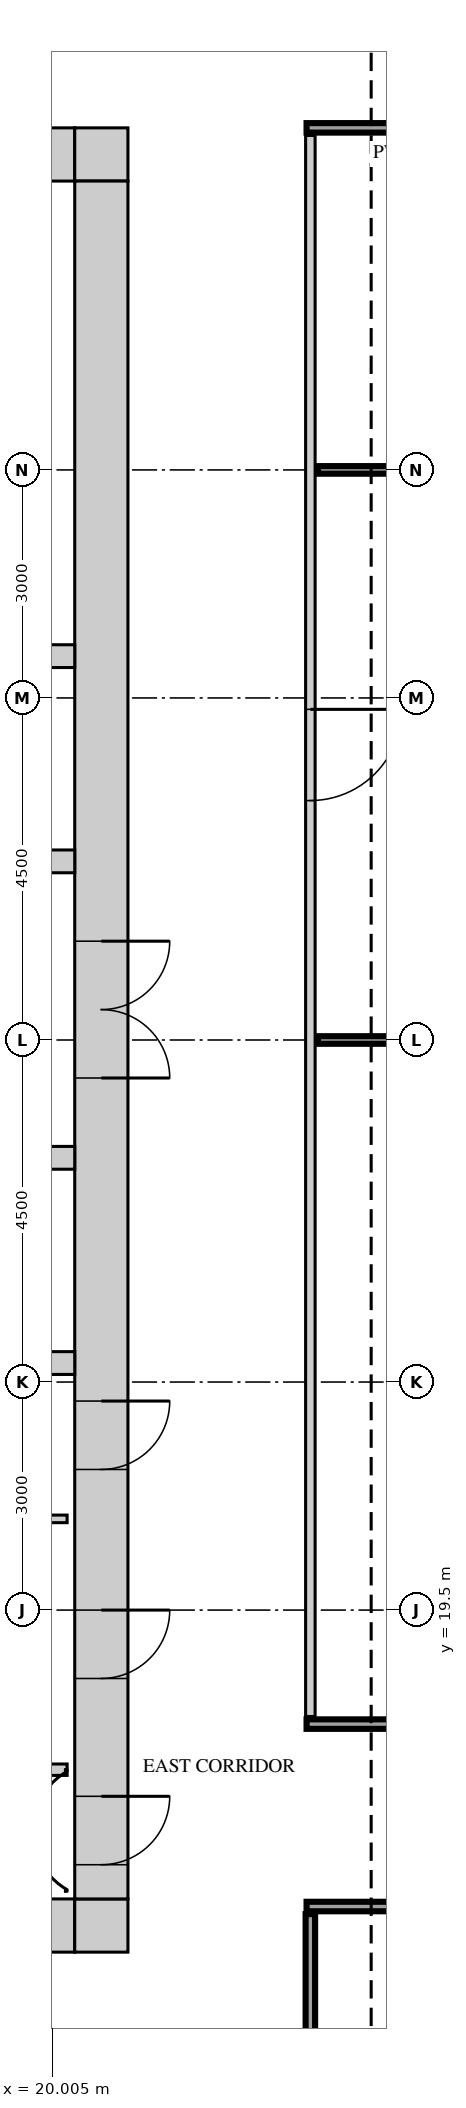
"""IFC4 building model, lengths in metres.
Left out: names, types, materials, properties, quantities, classifications, styles, units other than length and angle.
Written with IfcOpenShell. Run it as: python <this file> out.ifc"""

import sys

from ifc_helpers import new_model, si_unit, direction, frame, frame_2d, origin, place, context, subcontext, project, spatial, rectangle, extrude, source, transform, mapped, element, fill, save


model = new_model("IFC4")
c1 = context("Model", 3, precision=1e-05, world=origin(), true_north=direction((0.0, 1.0)))
c2 = subcontext(c1, "Body", "Model", "MODEL_VIEW")
j1 = project(units=[si_unit("LENGTHUNIT", "METRE"), si_unit("PLANEANGLEUNIT", "RADIAN")], contexts=[c1])
p1 = place(None, origin())
s1 = spatial("IfcSite", under=j1, at=p1, CompositionType="ELEMENT")
p2 = place(p1, origin())
s2 = spatial("IfcBuilding", under=s1, at=p2, CompositionType="ELEMENT")
p3 = place(p2, frame((0.0, 0.0, 250.2)))
s3 = spatial("IfcBuildingStorey", under=s2, at=p3, CompositionType="ELEMENT", Elevation=250.2)
m1 = source(origin(), c2, "Body", "SweptSolid", [
    extrude(rectangle(XDim=13.6, YDim=0.7, at=frame_2d((6.8, 0.0))), origin(), (0.0, 0.0, 1.0), 3.75),
])
p4 = place(p3, frame((6.7, 38.65, 0.0), z_axis=(0.0, 0.0, 1.0), x_axis=(1.0, 0.0, 0.0)))
e1 = element("IfcWall", 1, at=p4, inside=s3, PredefinedType="SHEAR", context=c2, shape_type="MappedRepresentation", body=[
    mapped(m1, transform((0.0, 0.0, 0.0))),
])
m2 = source(origin(), c2, "Body", "SweptSolid", [
    extrude(rectangle(XDim=0.9, YDim=2.1, at=frame_2d((0.45, 1.05))), frame((0.0, 0.36, 0.0), z_axis=(0.0, -1.0, 0.0), x_axis=(1.0, 0.0, 0.0)), (0.0, 0.0, 1.0), 0.72),
])
p5 = place(p4, frame((3.0, 0.0, 0.0)))
e2 = element("IfcOpeningElement", 2, at=p5, cuts=e1, PredefinedType="OPENING", context=c2, shape_type="MappedRepresentation", body=[
    mapped(m2, transform((0.0, 0.0, 0.0))),
])
p6 = place(p4, frame((9.7, 0.0, 0.0)))
e3 = element("IfcOpeningElement", 3, at=p6, cuts=e1, PredefinedType="OPENING", context=c2, shape_type="MappedRepresentation", body=[
    mapped(m2, transform((0.0, 0.0, 0.0))),
])
m3 = source(origin(), c2, "Body", "SweptSolid", [
    extrude(rectangle(XDim=0.7, YDim=0.7, at=frame_2d((0.35, 0.0))), origin(), (0.0, 0.0, 1.0), 3.75),
])
p7 = place(p3, frame((20.3, 38.65, 0.0), z_axis=(0.0, 0.0, 1.0), x_axis=(1.0, 0.0, 0.0)))
e4 = element("IfcWall", 4, at=p7, inside=s3, PredefinedType="SHEAR", context=c2, shape_type="MappedRepresentation", body=[
    mapped(m3, transform((0.0, 0.0, 0.0))),
])
p8 = place(p3, frame((6.7, 15.35, 0.0), z_axis=(0.0, 0.0, 1.0), x_axis=(1.0, 0.0, 0.0)))
e5 = element("IfcWall", 5, at=p8, inside=s3, PredefinedType="SHEAR", context=c2, shape_type="MappedRepresentation", body=[
    mapped(m1, transform((0.0, 0.0, 0.0))),
])
m4 = source(origin(), c2, "Body", "SweptSolid", [
    extrude(rectangle(XDim=1.2, YDim=2.1, at=frame_2d((0.6, 1.05))), frame((0.0, 0.36, 0.0), z_axis=(0.0, -1.0, 0.0), x_axis=(1.0, 0.0, 0.0)), (0.0, 0.0, 1.0), 0.72),
])
p9 = place(p8, frame((5.5, 0.0, 0.0)))
e6 = element("IfcOpeningElement", 6, at=p9, cuts=e5, PredefinedType="OPENING", context=c2, shape_type="MappedRepresentation", body=[
    mapped(m4, transform((0.0, 0.0, 0.0))),
])
p10 = place(p8, frame((2.15, 0.0, 0.0)))
e7 = element("IfcOpeningElement", 7, at=p10, cuts=e5, PredefinedType="OPENING", context=c2, shape_type="MappedRepresentation", body=[
    mapped(m4, transform((0.0, 0.0, 0.0))),
])
m5 = source(origin(), c2, "Body", "SweptSolid", [
    extrude(rectangle(XDim=1.0, YDim=2.1, at=frame_2d((0.5, 1.05))), frame((0.0, 0.36, 0.0), z_axis=(0.0, -1.0, 0.0), x_axis=(1.0, 0.0, 0.0)), (0.0, 0.0, 1.0), 0.72),
])
p11 = place(p8, frame((8.0, 0.0, 0.0)))
e8 = element("IfcOpeningElement", 8, at=p11, cuts=e5, PredefinedType="OPENING", context=c2, shape_type="MappedRepresentation", body=[
    mapped(m5, transform((0.0, 0.0, 0.0))),
])
p12 = place(p3, frame((20.3, 15.35, 0.0), z_axis=(0.0, 0.0, 1.0), x_axis=(1.0, 0.0, 0.0)))
e9 = element("IfcWall", 9, at=p12, inside=s3, PredefinedType="SHEAR", context=c2, shape_type="MappedRepresentation", body=[
    mapped(m3, transform((0.0, 0.0, 0.0))),
])
m6 = source(origin(), c2, "Body", "SweptSolid", [
    extrude(rectangle(XDim=22.6, YDim=0.7, at=frame_2d((11.3, 0.0))), origin(), (0.0, 0.0, 1.0), 3.75),
])
p13 = place(p3, frame((20.65, 15.7, 0.0), z_axis=(0.0, 0.0, 1.0), x_axis=(0.0, 1.0, 0.0)))
e10 = element("IfcWall", 10, at=p13, inside=s3, PredefinedType="SHEAR", context=c2, shape_type="MappedRepresentation", body=[
    mapped(m6, transform((0.0, 0.0, 0.0))),
])
m7 = source(origin(), c2, "Body", "SweptSolid", [
    extrude(rectangle(XDim=1.8, YDim=2.1, at=frame_2d((0.9, 1.05))), frame((0.0, 0.36, 0.0), z_axis=(0.0, -1.0, 0.0), x_axis=(1.0, 0.0, 0.0)), (0.0, 0.0, 1.0), 0.72),
])
p14 = place(p13, frame((10.8, 0.0, 0.0)))
e11 = element("IfcOpeningElement", 11, at=p14, cuts=e10, PredefinedType="OPENING", context=c2, shape_type="MappedRepresentation", body=[
    mapped(m7, transform((0.0, 0.0, 0.0))),
])
p15 = place(p13, frame((0.45, 0.0, 0.0)))
e12 = element("IfcOpeningElement", 12, at=p15, cuts=e10, PredefinedType="OPENING", context=c2, shape_type="MappedRepresentation", body=[
    mapped(m2, transform((0.0, 0.0, 0.0))),
])
p16 = place(p13, frame((2.9, 0.0, 0.0)))
e13 = element("IfcOpeningElement", 13, at=p16, cuts=e10, PredefinedType="OPENING", context=c2, shape_type="MappedRepresentation", body=[
    mapped(m2, transform((0.0, 0.0, 0.0))),
])
p17 = place(p13, frame((5.65, 0.0, 0.0)))
e14 = element("IfcOpeningElement", 14, at=p17, cuts=e10, PredefinedType="OPENING", context=c2, shape_type="MappedRepresentation", body=[
    mapped(m2, transform((0.0, 0.0, 0.0))),
])
m8 = source(origin(), c2, "Body", "SweptSolid", [
    extrude(rectangle(XDim=13.6, YDim=0.3, at=frame_2d((6.8, 0.0))), origin(), (0.0, 0.0, 1.0), 3.75),
])
for number, where, z_axis, x_axis in (
    (15, (6.7, 22.75, 0.0), (0.0, 0.0, 1.0), (1.0, 0.0, 0.0)),
    (16, (6.7, 32.05, 0.0), (0.0, 0.0, 1.0), (1.0, 0.0, 0.0)),
):
    element("IfcWall", number, at=place(p3, frame(where, z_axis=z_axis, x_axis=x_axis)), inside=s3, PredefinedType="STANDARD", context=c2, shape_type="MappedRepresentation", body=[
        mapped(m8, transform((0.0, 0.0, 0.0))),
    ])
p18 = place(p3, frame((6.7, 29.35, 0.0), z_axis=(0.0, 0.0, 1.0), x_axis=(1.0, 0.0, 0.0)))
e17 = element("IfcWall", 17, at=p18, inside=s3, PredefinedType="STANDARD", context=c2, shape_type="MappedRepresentation", body=[
    mapped(m8, transform((0.0, 0.0, 0.0))),
])
m9 = source(origin(), c2, "Body", "SweptSolid", [
    extrude(rectangle(XDim=1.2, YDim=2.1, at=frame_2d((0.6, 1.05))), frame((0.0, 0.16, 0.0), z_axis=(0.0, -1.0, 0.0), x_axis=(1.0, 0.0, 0.0)), (0.0, 0.0, 1.0), 0.32),
])
p19 = place(p18, frame((1.05, 0.0, 0.0)))
e18 = element("IfcOpeningElement", 18, at=p19, cuts=e17, PredefinedType="OPENING", context=c2, shape_type="MappedRepresentation", body=[
    mapped(m9, transform((0.0, 0.0, 0.0))),
])
p20 = place(p18, frame((3.6, 0.0, 0.0)))
e19 = element("IfcOpeningElement", 19, at=p20, cuts=e17, PredefinedType="OPENING", context=c2, shape_type="MappedRepresentation", body=[
    mapped(m9, transform((0.0, 0.0, 0.0))),
])
p21 = place(p18, frame((6.15, 0.0, 0.0)))
e20 = element("IfcOpeningElement", 20, at=p21, cuts=e17, PredefinedType="OPENING", context=c2, shape_type="MappedRepresentation", body=[
    mapped(m9, transform((0.0, 0.0, 0.0))),
])
p22 = place(p18, frame((8.7, 0.0, 0.0)))
e21 = element("IfcOpeningElement", 21, at=p22, cuts=e17, PredefinedType="OPENING", context=c2, shape_type="MappedRepresentation", body=[
    mapped(m9, transform((0.0, 0.0, 0.0))),
])
p23 = place(p18, frame((11.25, 0.0, 0.0)))
e22 = element("IfcOpeningElement", 22, at=p23, cuts=e17, PredefinedType="OPENING", context=c2, shape_type="MappedRepresentation", body=[
    mapped(m9, transform((0.0, 0.0, 0.0))),
])
p24 = place(p3, frame((6.7, 25.45, 0.0), z_axis=(0.0, 0.0, 1.0), x_axis=(1.0, 0.0, 0.0)))
e23 = element("IfcWall", 23, at=p24, inside=s3, PredefinedType="STANDARD", context=c2, shape_type="MappedRepresentation", body=[
    mapped(m8, transform((0.0, 0.0, 0.0))),
])
p25 = place(p24, frame((1.05, 0.0, 0.0)))
e24 = element("IfcOpeningElement", 24, at=p25, cuts=e23, PredefinedType="OPENING", context=c2, shape_type="MappedRepresentation", body=[
    mapped(m9, transform((0.0, 0.0, 0.0))),
])
p26 = place(p24, frame((3.6, 0.0, 0.0)))
e25 = element("IfcOpeningElement", 25, at=p26, cuts=e23, PredefinedType="OPENING", context=c2, shape_type="MappedRepresentation", body=[
    mapped(m9, transform((0.0, 0.0, 0.0))),
])
p27 = place(p24, frame((6.15, 0.0, 0.0)))
e26 = element("IfcOpeningElement", 26, at=p27, cuts=e23, PredefinedType="OPENING", context=c2, shape_type="MappedRepresentation", body=[
    mapped(m9, transform((0.0, 0.0, 0.0))),
])
p28 = place(p24, frame((8.7, 0.0, 0.0)))
e27 = element("IfcOpeningElement", 27, at=p28, cuts=e23, PredefinedType="OPENING", context=c2, shape_type="MappedRepresentation", body=[
    mapped(m9, transform((0.0, 0.0, 0.0))),
])
p29 = place(p24, frame((11.25, 0.0, 0.0)))
e28 = element("IfcOpeningElement", 28, at=p29, cuts=e23, PredefinedType="OPENING", context=c2, shape_type="MappedRepresentation", body=[
    mapped(m9, transform((0.0, 0.0, 0.0))),
])
m10 = source(origin(), c2, "Body", "SweptSolid", [
    extrude(rectangle(XDim=10.85, YDim=0.125, at=frame_2d((5.425, 0.0))), origin(), (0.0, 0.0, 1.0), 3.8),
])
p30 = place(p3, frame((23.4, 4.65, 0.0), z_axis=(0.0, 0.0, 1.0), x_axis=(0.0, 1.0, 0.0)))
e29 = element("IfcWall", 29, at=p30, inside=s3, PredefinedType="PARTITIONING", context=c2, shape_type="MappedRepresentation", body=[
    mapped(m10, transform((0.0, 0.0, 0.0))),
])
m11 = source(origin(), c2, "Body", "SweptSolid", [
    extrude(rectangle(XDim=0.9, YDim=2.1, at=frame_2d((0.45, 1.05))), frame((0.0, 0.073, 0.0), z_axis=(0.0, -1.0, 0.0), x_axis=(1.0, 0.0, 0.0)), (0.0, 0.0, 1.0), 0.145),
])
p31 = place(p30, frame((4.5, 0.0, 0.0)))
e30 = element("IfcOpeningElement", 30, at=p31, cuts=e29, PredefinedType="OPENING", context=c2, shape_type="MappedRepresentation", body=[
    mapped(m11, transform((0.0, 0.0, 0.0))),
])
m12 = source(origin(), c2, "Body", "SweptSolid", [
    extrude(rectangle(XDim=26.0, YDim=0.125, at=frame_2d((13.0, 0.0))), origin(), (0.0, 0.0, 1.0), 3.8),
])
p32 = place(p3, frame((23.35, 15.6, 0.0), z_axis=(0.0, 0.0, 1.0), x_axis=(1.0, 0.0, 0.0)))
e31 = element("IfcWall", 31, at=p32, inside=s3, PredefinedType="PARTITIONING", context=c2, shape_type="MappedRepresentation", body=[
    mapped(m12, transform((0.0, 0.0, 0.0))),
])
p33 = place(p32, frame((4.05, 0.0, 0.0)))
e32 = element("IfcOpeningElement", 32, at=p33, cuts=e31, PredefinedType="OPENING", context=c2, shape_type="MappedRepresentation", body=[
    mapped(m11, transform((0.0, 0.0, 0.0))),
])
m13 = source(origin(), c2, "Body", "SweptSolid", [
    extrude(rectangle(XDim=1.0, YDim=2.1, at=frame_2d((0.5, 1.05))), frame((0.0, 0.073, 0.0), z_axis=(0.0, -1.0, 0.0), x_axis=(1.0, 0.0, 0.0)), (0.0, 0.0, 1.0), 0.145),
])
p34 = place(p32, frame((6.85, 0.0, 0.0)))
e33 = element("IfcOpeningElement", 33, at=p34, cuts=e31, PredefinedType="OPENING", context=c2, shape_type="MappedRepresentation", body=[
    mapped(m13, transform((0.0, 0.0, 0.0))),
])
p35 = place(p32, frame((9.25, 0.0, 0.0)))
e34 = element("IfcOpeningElement", 34, at=p35, cuts=e31, PredefinedType="OPENING", context=c2, shape_type="MappedRepresentation", body=[
    mapped(m11, transform((0.0, 0.0, 0.0))),
])
m14 = source(origin(), c2, "Body", "SweptSolid", [
    extrude(rectangle(XDim=1.2, YDim=2.1, at=frame_2d((0.6, 1.05))), frame((0.0, 0.073, 0.0), z_axis=(0.0, -1.0, 0.0), x_axis=(1.0, 0.0, 0.0)), (0.0, 0.0, 1.0), 0.145),
])
p36 = place(p32, frame((18.05, 0.0, 0.0)))
e35 = element("IfcOpeningElement", 35, at=p36, cuts=e31, PredefinedType="OPENING", context=c2, shape_type="MappedRepresentation", body=[
    mapped(m14, transform((0.0, 0.0, 0.0))),
])
m15 = source(origin(), c2, "Body", "SweptSolid", [
    extrude(rectangle(XDim=4.0, YDim=0.15, at=frame_2d((2.0, 0.0))), origin(), (0.0, 0.0, 1.0), 3.8),
])
p37 = place(p3, frame((16.2, 17.4, 0.0), z_axis=(0.0, 0.0, 1.0), x_axis=(1.0, 0.0, 0.0)))
e36 = element("IfcWall", 36, at=p37, inside=s3, PredefinedType="PARTITIONING", context=c2, shape_type="MappedRepresentation", body=[
    mapped(m15, transform((0.0, 0.0, 0.0))),
])
p38 = place(p3, frame((23.35, 18.0, 0.0), z_axis=(0.0, 0.0, 1.0), x_axis=(1.0, 0.0, 0.0)))
e37 = element("IfcWall", 37, at=p38, inside=s3, PredefinedType="PARTITIONING", context=c2, shape_type="MappedRepresentation", body=[
    mapped(m12, transform((0.0, 0.0, 0.0))),
])
p39 = place(p38, frame((12.5, 0.0, 0.0)))
e38 = element("IfcOpeningElement", 38, at=p39, cuts=e37, PredefinedType="OPENING", context=c2, shape_type="MappedRepresentation", body=[
    mapped(m14, transform((0.0, 0.0, 0.0))),
])
m16 = source(origin(), c2, "Body", "SweptSolid", [
    extrude(rectangle(XDim=20.8, YDim=0.125, at=frame_2d((10.4, 0.0))), origin(), (0.0, 0.0, 1.0), 3.8),
])
p40 = place(p3, frame((23.4, 18.1, 0.0), z_axis=(0.0, 0.0, 1.0), x_axis=(0.0, 1.0, 0.0)))
e39 = element("IfcWall", 39, at=p40, inside=s3, PredefinedType="PARTITIONING", context=c2, shape_type="MappedRepresentation", body=[
    mapped(m16, transform((0.0, 0.0, 0.0))),
])
p41 = place(p40, frame((12.05, 0.0, 0.0)))
e40 = element("IfcOpeningElement", 40, at=p41, cuts=e39, PredefinedType="OPENING", context=c2, shape_type="MappedRepresentation", body=[
    mapped(m14, transform((0.0, 0.0, 0.0))),
])
m17 = source(origin(), c2, "Body", "SweptSolid", [
    extrude(rectangle(XDim=4.1, YDim=0.1, at=frame_2d((2.05, 0.0))), origin(), (0.0, 0.0, 1.0), 3.8),
])
p42 = place(p3, frame((16.1, 20.7, 0.0), z_axis=(0.0, 0.0, 1.0), x_axis=(1.0, 0.0, 0.0)))
e41 = element("IfcWall", 41, at=p42, inside=s3, PredefinedType="PARTITIONING", context=c2, shape_type="MappedRepresentation", body=[
    mapped(m17, transform((0.0, 0.0, 0.0))),
])
m18 = source(origin(), c2, "Body", "SweptSolid", [
    extrude(rectangle(XDim=25.85, YDim=0.1, at=frame_2d((12.925, 0.0))), origin(), (0.0, 0.0, 1.0), 3.8),
])
for number, where, z_axis, x_axis in (
    (42, (23.5, 27.0, 0.0), (0.0, 0.0, 1.0), (1.0, 0.0, 0.0)),
    (43, (23.5, 34.5, 0.0), (0.0, 0.0, 1.0), (1.0, 0.0, 0.0)),
):
    element("IfcWall", number, at=place(p3, frame(where, z_axis=z_axis, x_axis=x_axis)), inside=s3, PredefinedType="PARTITIONING", context=c2, shape_type="MappedRepresentation", body=[
        mapped(m18, transform((0.0, 0.0, 0.0))),
    ])
m19 = source(origin(), c2, "Body", "SweptSolid", [
    extrude(rectangle(XDim=7.1, YDim=0.125, at=frame_2d((3.55, 0.0))), origin(), (0.0, 0.0, 1.0), 3.8),
])
p43 = place(p3, frame((23.35, 39.0, 0.0), z_axis=(0.0, 0.0, 1.0), x_axis=(1.0, 0.0, 0.0)))
e44 = element("IfcWall", 44, at=p43, inside=s3, PredefinedType="PARTITIONING", context=c2, shape_type="MappedRepresentation", body=[
    mapped(m19, transform((0.0, 0.0, 0.0))),
])
p44 = place(p43, frame((2.95, 0.0, 0.0)))
e45 = element("IfcOpeningElement", 45, at=p44, cuts=e44, PredefinedType="OPENING", context=c2, shape_type="MappedRepresentation", body=[
    mapped(m14, transform((0.0, 0.0, 0.0))),
])
m20 = source(origin(), c2, "Body", "SweptSolid", [
    extrude(rectangle(XDim=1.8, YDim=2.1, at=frame_2d((0.9, 1.05))), frame((0.0, 0.3, 0.0), z_axis=(0.0, -1.0, 0.0), x_axis=(1.0, 0.0, 0.0)), (0.0, 0.0, 1.0), 0.6),
])
p45 = place(p14, origin())
e46 = element("IfcDoor", 46, at=p45, inside=s3, OperationType="DOUBLE_DOOR_SINGLE_SWING", PredefinedType="DOOR", context=c2, shape_type="MappedRepresentation", body=[
    mapped(m20, transform((0.0, 0.0, 0.0))),
])
fill(e11, e46)
m21 = source(origin(), c2, "Body", "SweptSolid", [
    extrude(rectangle(XDim=0.9, YDim=2.1, at=frame_2d((0.45, 1.05))), frame((0.0, 0.3, 0.0), z_axis=(0.0, -1.0, 0.0), x_axis=(1.0, 0.0, 0.0)), (0.0, 0.0, 1.0), 0.6),
])
p46 = place(p15, origin())
e47 = element("IfcDoor", 47, at=p46, inside=s3, OperationType="SINGLE_SWING_RIGHT", PredefinedType="DOOR", context=c2, shape_type="MappedRepresentation", body=[
    mapped(m21, transform((0.0, 0.0, 0.0))),
])
fill(e12, e47)
p47 = place(p16, origin())
e48 = element("IfcDoor", 48, at=p47, inside=s3, OperationType="SINGLE_SWING_RIGHT", PredefinedType="DOOR", context=c2, shape_type="MappedRepresentation", body=[
    mapped(m21, transform((0.0, 0.0, 0.0))),
])
fill(e13, e48)
p48 = place(p17, origin())
e49 = element("IfcDoor", 49, at=p48, inside=s3, OperationType="SINGLE_SWING_RIGHT", PredefinedType="DOOR", context=c2, shape_type="MappedRepresentation", body=[
    mapped(m21, transform((0.0, 0.0, 0.0))),
])
fill(e14, e49)
m22 = source(origin(), c2, "Body", "SweptSolid", [
    extrude(rectangle(XDim=1.2, YDim=2.1, at=frame_2d((0.6, 1.05))), frame((0.0, 0.025, 0.0), z_axis=(0.0, -1.0, 0.0), x_axis=(1.0, 0.0, 0.0)), (0.0, 0.0, 1.0), 0.05),
])
p49 = place(p41, origin())
e50 = element("IfcDoor", 50, at=p49, inside=s3, OperationType="SINGLE_SWING_RIGHT", PredefinedType="DOOR", context=c2, shape_type="MappedRepresentation", body=[
    mapped(m22, transform((0.0, 0.0, 0.0))),
])
fill(e40, e50)
save(model, sys.argv[1])
